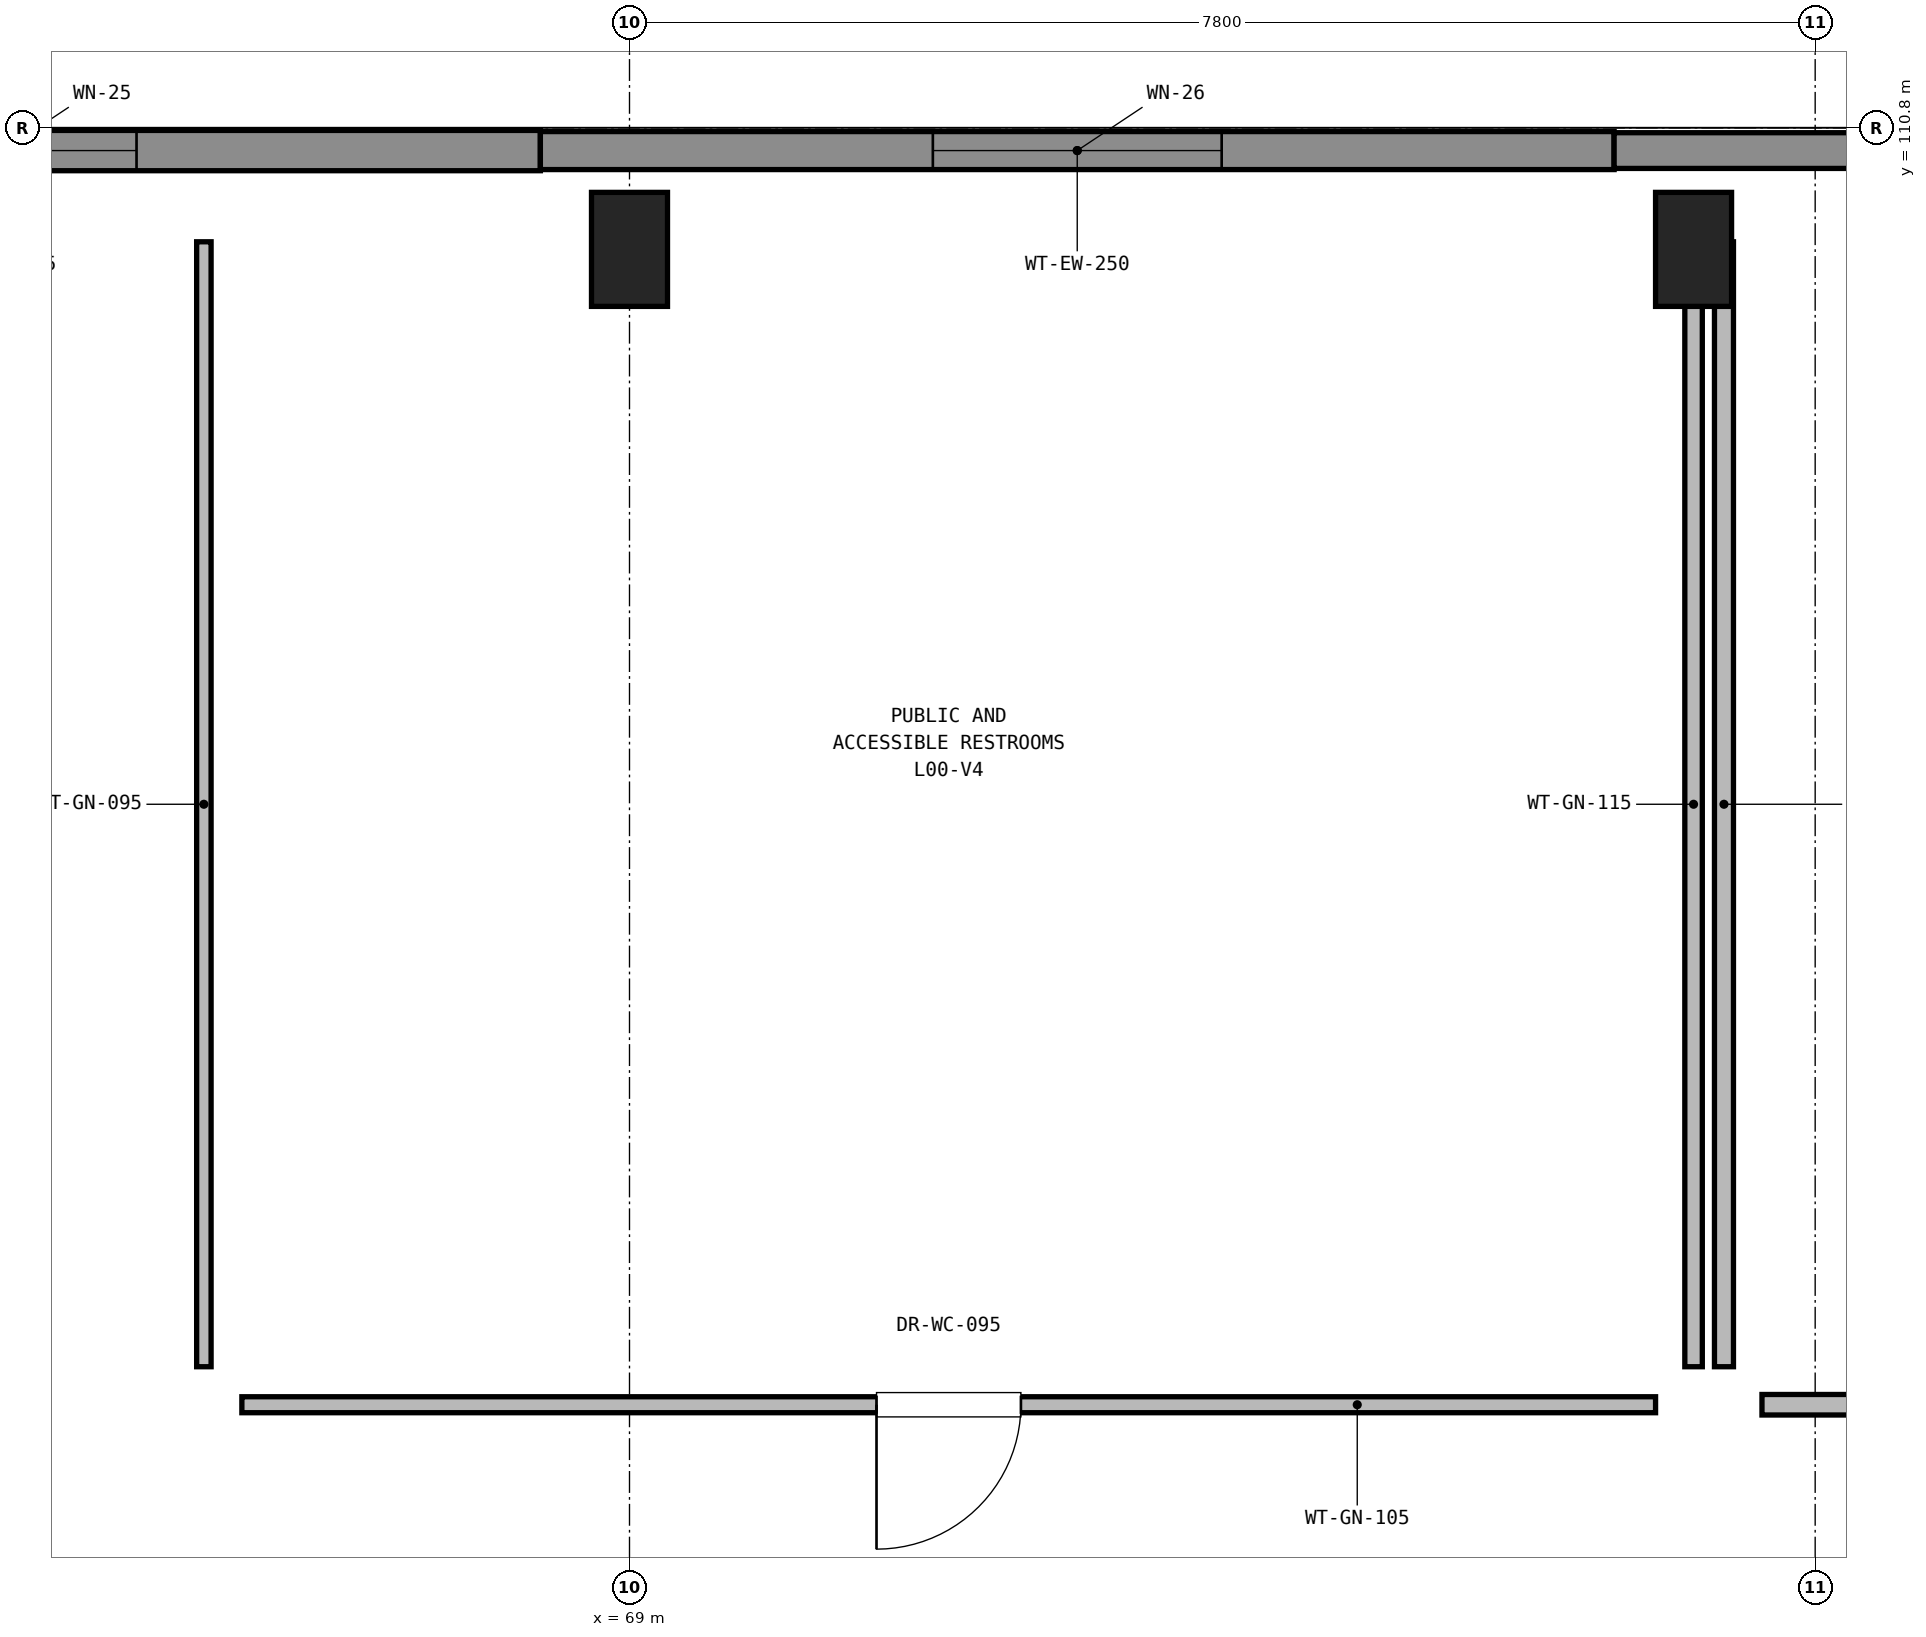
"""IFC4 building model, lengths in metres.
Left out: names, types, materials, properties, quantities, classifications, styles, units other than length and angle.
Written with IfcOpenShell. Run it as: python <this file> out.ifc"""

import sys

from ifc_helpers import new_model, si_unit, direction, frame, frame_2d, origin, origin_2d, place, context, subcontext, project, spatial, rectangle, extrude, element, fill, save


model = new_model("IFC4")
c1 = context("Model", 3, precision=1e-05, world=origin(), true_north=direction((0.0, 1.0)))
c2 = subcontext(c1, "Body", "Model", "MODEL_VIEW")
j1 = project(units=[si_unit("LENGTHUNIT", "METRE"), si_unit("PLANEANGLEUNIT", "RADIAN")], contexts=[c1])
p1 = place(None, origin())
s1 = spatial("IfcSite", under=j1, at=p1, CompositionType="ELEMENT")
p2 = place(p1, origin())
s2 = spatial("IfcBuilding", under=s1, at=p2, CompositionType="ELEMENT")
p3 = place(p2, origin())
s3 = spatial("IfcBuildingStorey", under=s2, at=p3, CompositionType="ELEMENT", Elevation=0.0)
for number, where, z_axis, x_axis in (
    (1, (69.0, 110.0, 0.0), (0.0, 0.0, 1.0), (1.0, 0.0, 0.0)),
    (2, (76.0, 110.0, 0.0), (0.0, 0.0, 1.0), (1.0, 0.0, 0.0)),
):
    element("IfcColumn", number, at=place(p3, frame(where, z_axis=z_axis, x_axis=x_axis)), inside=s3, PredefinedType="COLUMN", context=c2, shape_type="SweptSolid", body=[
        extrude(rectangle(XDim=0.5, YDim=0.75, at=origin_2d()), origin(), (0.0, 0.0, 1.0), 5.1),
    ])
p4 = place(p3, frame((61.35, 110.65, 0.0), z_axis=(0.0, 0.0, 1.0), x_axis=(1.0, 0.0, 0.0)))
e3 = element("IfcWall", 3, at=p4, inside=s3, PredefinedType="SOLIDWALL", context=c2, shape_type="SweptSolid", body=[
    extrude(rectangle(XDim=7.063, YDim=0.265, at=frame_2d((3.532, 0.0))), origin(), (0.0, 0.0, 1.0), 4.81),
])
p5 = place(p4, frame((2.657, 0.0, 0.9)))
e4 = element("IfcOpeningElement", 4, at=p5, cuts=e3, PredefinedType="OPENING", context=c2, shape_type="SweptSolid", body=[
    extrude(rectangle(XDim=1.75, YDim=2.0, at=frame_2d((0.875, 1.0))), frame((0.0, 0.142, 0.0), z_axis=(0.0, -1.0, 0.0), x_axis=(1.0, 0.0, 0.0)), (0.0, 0.0, 1.0), 0.285),
])
p6 = place(p3, frame((68.414, 110.65, 0.0), z_axis=(0.0, 0.0, 1.0), x_axis=(1.0, 0.0, 0.0)))
e5 = element("IfcWall", 5, at=p6, inside=s3, PredefinedType="SOLIDWALL", context=c2, shape_type="SweptSolid", body=[
    extrude(rectangle(XDim=7.064, YDim=0.25, at=frame_2d((3.532, 0.0))), origin(), (0.0, 0.0, 1.0), 4.81),
])
p7 = place(p6, frame((2.582, 0.0, 0.9)))
e6 = element("IfcOpeningElement", 6, at=p7, cuts=e5, PredefinedType="OPENING", context=c2, shape_type="SweptSolid", body=[
    extrude(rectangle(XDim=1.9, YDim=2.0, at=frame_2d((0.95, 1.0))), frame((0.0, 0.135, 0.0), z_axis=(0.0, -1.0, 0.0), x_axis=(1.0, 0.0, 0.0)), (0.0, 0.0, 1.0), 0.27),
])
p8 = place(p3, frame((75.477, 110.65, 0.0), z_axis=(0.0, 0.0, 1.0), x_axis=(1.0, 0.0, 0.0)))
e7 = element("IfcWall", 7, at=p8, inside=s3, PredefinedType="SOLIDWALL", context=c2, shape_type="SweptSolid", body=[
    extrude(rectangle(XDim=7.064, YDim=0.235, at=frame_2d((3.532, 0.0))), origin(), (0.0, 0.0, 1.0), 4.81),
])
p9 = place(p8, frame((2.507, 0.0, 0.9)))
e8 = element("IfcOpeningElement", 8, at=p9, cuts=e7, PredefinedType="OPENING", context=c2, shape_type="SweptSolid", body=[
    extrude(rectangle(XDim=2.05, YDim=2.0, at=frame_2d((1.025, 1.0))), frame((0.0, 0.127, 0.0), z_axis=(0.0, -1.0, 0.0), x_axis=(1.0, 0.0, 0.0)), (0.0, 0.0, 1.0), 0.255),
])
p10 = place(p3, frame((76.0, 110.05, 0.0), z_axis=(0.0, 0.0, 1.0), x_axis=(0.0, -1.0, 0.0)))
e9 = element("IfcWall", 9, at=p10, inside=s3, PredefinedType="PARTITIONING", context=c2, shape_type="SweptSolid", body=[
    extrude(rectangle(XDim=7.4, YDim=0.115, at=frame_2d((3.7, 0.0))), origin(), (0.0, 0.0, 1.0), 4.01),
])
p11 = place(p3, frame((75.75, 102.4, 0.0), z_axis=(0.0, 0.0, 1.0), x_axis=(-1.0, 0.0, 0.0)))
e10 = element("IfcWall", 10, at=p11, inside=s3, PredefinedType="PARTITIONING", context=c2, shape_type="SweptSolid", body=[
    extrude(rectangle(XDim=9.3, YDim=0.105, at=frame_2d((4.65, 0.0))), origin(), (0.0, 0.0, 1.0), 4.01),
])
p12 = place(p11, frame((4.175, 0.0, 0.0)))
e11 = element("IfcOpeningElement", 11, at=p12, cuts=e10, PredefinedType="OPENING", context=c2, shape_type="SweptSolid", body=[
    extrude(rectangle(XDim=0.95, YDim=2.15, at=frame_2d((0.475, 1.075))), frame((0.0, 0.062, 0.0), z_axis=(0.0, -1.0, 0.0), x_axis=(1.0, 0.0, 0.0)), (0.0, 0.0, 1.0), 0.125),
])
p13 = place(p3, frame((66.2, 102.65, 0.0), z_axis=(0.0, 0.0, 1.0), x_axis=(0.0, 1.0, 0.0)))
e12 = element("IfcWall", 12, at=p13, inside=s3, PredefinedType="PARTITIONING", context=c2, shape_type="SweptSolid", body=[
    extrude(rectangle(XDim=7.4, YDim=0.095, at=frame_2d((3.7, 0.0))), origin(), (0.0, 0.0, 1.0), 4.16),
])
p14 = place(p3, frame((84.2, 102.4, 0.0), z_axis=(0.0, 0.0, 1.0), x_axis=(-1.0, 0.0, 0.0)))
e13 = element("IfcWall", 13, at=p14, inside=s3, PredefinedType="PARTITIONING", context=c2, shape_type="SweptSolid", body=[
    extrude(rectangle(XDim=7.75, YDim=0.135, at=frame_2d((3.875, 0.0))), origin(), (0.0, 0.0, 1.0), 4.81),
])
p15 = place(p3, frame((76.2, 102.65, 0.0), z_axis=(0.0, 0.0, 1.0), x_axis=(0.0, 1.0, 0.0)))
e14 = element("IfcWall", 14, at=p15, inside=s3, PredefinedType="PARTITIONING", context=c2, shape_type="SweptSolid", body=[
    extrude(rectangle(XDim=7.4, YDim=0.125, at=frame_2d((3.7, 0.0))), origin(), (0.0, 0.0, 1.0), 4.01),
])
p16 = place(p5, origin())
e15 = element("IfcWindow", 15, at=p16, inside=s3, PartitioningType="SINGLE_PANEL", PredefinedType="WINDOW", context=c2, shape_type="SweptSolid", body=[
    extrude(rectangle(XDim=1.75, YDim=2.0, at=frame_2d((0.875, 1.0))), frame((0.0, 0.03, 0.0), z_axis=(0.0, -1.0, 0.0), x_axis=(1.0, 0.0, 0.0)), (0.0, 0.0, 1.0), 0.06),
])
fill(e4, e15)
p17 = place(p7, origin())
e16 = element("IfcWindow", 16, at=p17, inside=s3, PartitioningType="SINGLE_PANEL", PredefinedType="WINDOW", context=c2, shape_type="SweptSolid", body=[
    extrude(rectangle(XDim=1.9, YDim=2.0, at=frame_2d((0.95, 1.0))), frame((0.0, 0.03, 0.0), z_axis=(0.0, -1.0, 0.0), x_axis=(1.0, 0.0, 0.0)), (0.0, 0.0, 1.0), 0.06),
])
fill(e6, e16)
p18 = place(p12, origin())
e17 = element("IfcDoor", 17, at=p18, inside=s3, OperationType="SINGLE_SWING_RIGHT", PredefinedType="DOOR", context=c2, shape_type="SweptSolid", body=[
    extrude(rectangle(XDim=0.95, YDim=2.15, at=frame_2d((0.475, 1.075))), frame((0.0, 0.025, 0.0), z_axis=(0.0, -1.0, 0.0), x_axis=(1.0, 0.0, 0.0)), (0.0, 0.0, 1.0), 0.05),
])
fill(e11, e17)
save(model, sys.argv[1])
